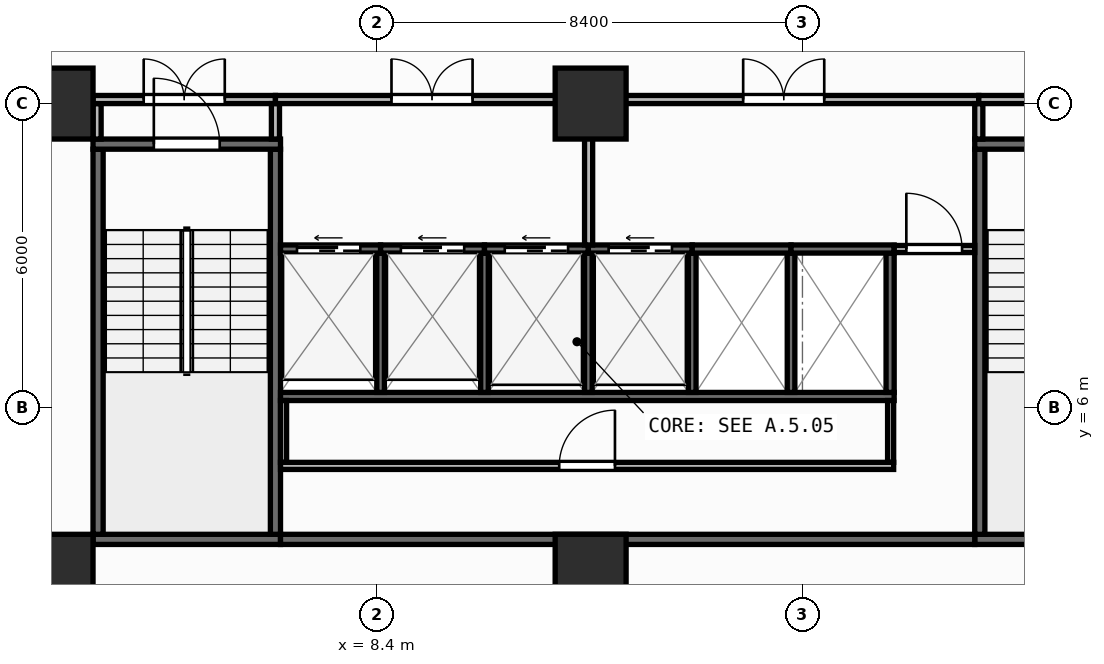
"""IFC4 building model, lengths in metres.
Left out: names, types, materials, properties, quantities, classifications, styles, units other than length and angle.
Written with IfcOpenShell. Run it as: python <this file> out.ifc"""

import sys

from ifc_helpers import new_model, si_unit, direction, frame, frame_2d, origin, origin_2d, place, context, subcontext, project, spatial, rectangle, extrude, element, fill, save


model = new_model("IFC4")
c1 = context("Model", 3, precision=1e-05, world=origin(), true_north=direction((0.0, 1.0)))
c2 = subcontext(c1, "Body", "Model", "MODEL_VIEW")
j1 = project(units=[si_unit("LENGTHUNIT", "METRE"), si_unit("PLANEANGLEUNIT", "RADIAN")], contexts=[c1])
p1 = place(None, origin())
s1 = spatial("IfcSite", under=j1, at=p1, CompositionType="ELEMENT")
p2 = place(p1, origin())
s2 = spatial("IfcBuilding", under=s1, at=p2, CompositionType="ELEMENT")
p3 = place(p2, frame((0.0, 0.0, 22.5)))
s3 = spatial("IfcBuildingStorey", under=s2, at=p3, CompositionType="ELEMENT", Elevation=22.5)
for number, where, z_axis, x_axis in (
    (1, (2.1, 2.8, 0.0), (0.0, 0.0, 1.0), (1.0, 0.0, 0.0)),
    (2, (12.62, 2.8, 0.0), (0.0, 0.0, 1.0), (1.0, 0.0, 0.0)),
    (3, (2.1, 12.0, 0.0), (0.0, 0.0, 1.0), (1.0, 0.0, 0.0)),
    (4, (12.62, 12.0, 0.0), (0.0, 0.0, 1.0), (1.0, 0.0, 0.0)),
):
    element("IfcColumn", number, at=place(p3, frame(where, z_axis=z_axis, x_axis=x_axis)), inside=s3, PredefinedType="COLUMN", context=c2, shape_type="SweptSolid", body=[
        extrude(rectangle(XDim=1.4, YDim=1.4, at=origin_2d()), origin(), (0.0, 0.0, 1.0), 3.95),
    ])
p4 = place(p3, frame((2.76, 0.174, 0.0), z_axis=(0.0, 0.0, 1.0), x_axis=(0.996571478456, 0.082736257641, 0.0)))
e5 = element("IfcWall", 5, at=p4, inside=s3, PredefinedType="STANDARD", context=c2, shape_type="SweptSolid", body=[
    extrude(rectangle(XDim=52.861, YDim=0.26, at=frame_2d((26.431, 0.0))), origin(), (0.0, 0.0, 1.0), 3.71),
])
p5 = place(p4, frame((25.231, 0.0, 0.9)))
e6 = element("IfcOpeningElement", 6, at=p5, cuts=e5, PredefinedType="OPENING", context=c2, shape_type="SweptSolid", body=[
    extrude(rectangle(XDim=2.4, YDim=1.65, at=frame_2d((1.2, 0.825))), frame((0.0, 0.14, 0.0), z_axis=(0.0, -1.0, 0.0), x_axis=(1.0, 0.0, 0.0)), (0.0, 0.0, 1.0), 0.28),
])
p6 = place(p3, frame((2.8, 3.4, 0.0), z_axis=(0.0, 0.0, 1.0), x_axis=(1.0, 0.0, 0.0)))
e7 = element("IfcWall", 7, at=p6, inside=s3, PredefinedType="SHEAR", context=c2, shape_type="SweptSolid", body=[
    extrude(rectangle(XDim=3.7, YDim=0.2, at=frame_2d((1.85, 0.0))), origin(), (0.0, 0.0, 1.0), 3.71),
])
for number, where, z_axis, x_axis in (
    (8, (2.9, 3.5, 0.0), (0.0, 0.0, 1.0), (0.0, 1.0, 0.0)),
    (9, (6.4, 3.5, 0.0), (0.0, 0.0, 1.0), (0.0, 1.0, 0.0)),
):
    element("IfcWall", number, at=place(p3, frame(where, z_axis=z_axis, x_axis=x_axis)), inside=s3, PredefinedType="SHEAR", context=c2, shape_type="SweptSolid", body=[
        extrude(rectangle(XDim=7.6, YDim=0.2, at=frame_2d((3.8, 0.0))), origin(), (0.0, 0.0, 1.0), 3.71),
    ])
p7 = place(p3, frame((2.8, 11.2, 0.0), z_axis=(0.0, 0.0, 1.0), x_axis=(1.0, 0.0, 0.0)))
e10 = element("IfcWall", 10, at=p7, inside=s3, PredefinedType="SHEAR", context=c2, shape_type="SweptSolid", body=[
    extrude(rectangle(XDim=3.7, YDim=0.2, at=frame_2d((1.85, 0.0))), origin(), (0.0, 0.0, 1.0), 3.71),
])
p8 = place(p7, frame((1.2, 0.0, 0.0)))
e11 = element("IfcOpeningElement", 11, at=p8, cuts=e10, PredefinedType="OPENING", context=c2, shape_type="SweptSolid", body=[
    extrude(rectangle(XDim=1.3, YDim=2.15, at=frame_2d((0.65, 1.075))), frame((0.0, 0.11, 0.0), z_axis=(0.0, -1.0, 0.0), x_axis=(1.0, 0.0, 0.0)), (0.0, 0.0, 1.0), 0.22),
])
p9 = place(p3, frame((20.2, 3.4, 0.0), z_axis=(0.0, 0.0, 1.0), x_axis=(1.0, 0.0, 0.0)))
e12 = element("IfcWall", 12, at=p9, inside=s3, PredefinedType="SHEAR", context=c2, shape_type="SweptSolid", body=[
    extrude(rectangle(XDim=3.7, YDim=0.2, at=frame_2d((1.85, 0.0))), origin(), (0.0, 0.0, 1.0), 3.71),
])
p10 = place(p3, frame((20.3, 3.5, 0.0), z_axis=(0.0, 0.0, 1.0), x_axis=(0.0, 1.0, 0.0)))
e13 = element("IfcWall", 13, at=p10, inside=s3, PredefinedType="SHEAR", context=c2, shape_type="SweptSolid", body=[
    extrude(rectangle(XDim=7.6, YDim=0.2, at=frame_2d((3.8, 0.0))), origin(), (0.0, 0.0, 1.0), 3.71),
])
p11 = place(p3, frame((20.2, 11.2, 0.0), z_axis=(0.0, 0.0, 1.0), x_axis=(1.0, 0.0, 0.0)))
e14 = element("IfcWall", 14, at=p11, inside=s3, PredefinedType="SHEAR", context=c2, shape_type="SweptSolid", body=[
    extrude(rectangle(XDim=3.7, YDim=0.2, at=frame_2d((1.85, 0.0))), origin(), (0.0, 0.0, 1.0), 3.71),
])
p12 = place(p11, frame((1.2, 0.0, 0.0)))
e15 = element("IfcOpeningElement", 15, at=p12, cuts=e14, PredefinedType="OPENING", context=c2, shape_type="SweptSolid", body=[
    extrude(rectangle(XDim=1.3, YDim=2.15, at=frame_2d((0.65, 1.075))), frame((0.0, 0.11, 0.0), z_axis=(0.0, -1.0, 0.0), x_axis=(1.0, 0.0, 0.0)), (0.0, 0.0, 1.0), 0.22),
])
p13 = place(p3, frame((6.5, 3.4, 0.0), z_axis=(0.0, 0.0, 1.0), x_axis=(1.0, 0.0, 0.0)))
e16 = element("IfcWall", 16, at=p13, inside=s3, PredefinedType="SHEAR", context=c2, shape_type="SweptSolid", body=[
    extrude(rectangle(XDim=13.7, YDim=0.2, at=frame_2d((6.85, 0.0))), origin(), (0.0, 0.0, 1.0), 3.71),
])
p14 = place(p3, frame((6.5, 6.22, 0.0), z_axis=(0.0, 0.0, 1.0), x_axis=(1.0, 0.0, 0.0)))
e17 = element("IfcWall", 17, at=p14, inside=s3, PredefinedType="SHEAR", context=c2, shape_type="SweptSolid", body=[
    extrude(rectangle(XDim=12.11, YDim=0.16, at=frame_2d((6.055, 0.0))), origin(), (0.0, 0.0, 1.0), 3.71),
])
p15 = place(p3, frame((18.53, 6.3, 0.0), z_axis=(0.0, 0.0, 1.0), x_axis=(0.0, 1.0, 0.0)))
e18 = element("IfcWall", 18, at=p15, inside=s3, PredefinedType="SHEAR", context=c2, shape_type="SweptSolid", body=[
    extrude(rectangle(XDim=2.75, YDim=0.16, at=frame_2d((1.375, 0.0))), origin(), (0.0, 0.0, 1.0), 3.71),
])
for number, where, z_axis, x_axis in (
    (19, (8.475, 6.3, 0.0), (0.0, 0.0, 1.0), (0.0, 1.0, 0.0)),
    (20, (10.525, 6.3, 0.0), (0.0, 0.0, 1.0), (0.0, 1.0, 0.0)),
    (21, (12.575, 6.3, 0.0), (0.0, 0.0, 1.0), (0.0, 1.0, 0.0)),
    (22, (14.625, 6.3, 0.0), (0.0, 0.0, 1.0), (0.0, 1.0, 0.0)),
    (23, (16.575, 6.3, 0.0), (0.0, 0.0, 1.0), (0.0, 1.0, 0.0)),
):
    element("IfcWall", number, at=place(p3, frame(where, z_axis=z_axis, x_axis=x_axis)), inside=s3, PredefinedType="SHEAR", context=c2, shape_type="SweptSolid", body=[
        extrude(rectangle(XDim=2.75, YDim=0.15, at=frame_2d((1.375, 0.0))), origin(), (0.0, 0.0, 1.0), 3.71),
    ])
p16 = place(p3, frame((6.5, 9.13, 0.0), z_axis=(0.0, 0.0, 1.0), x_axis=(1.0, 0.0, 0.0)))
e24 = element("IfcWall", 24, at=p16, inside=s3, PredefinedType="SHEAR", context=c2, shape_type="SweptSolid", body=[
    extrude(rectangle(XDim=1.975, YDim=0.16, at=frame_2d((0.988, 0.0))), origin(), (0.0, 0.0, 1.0), 3.71),
])
p17 = place(p16, frame((0.325, 0.0, 0.0)))
e25 = element("IfcOpeningElement", 25, at=p17, cuts=e24, PredefinedType="OPENING", context=c2, shape_type="SweptSolid", body=[
    extrude(rectangle(XDim=1.25, YDim=2.15, at=frame_2d((0.625, 1.075))), frame((0.0, 0.09, 0.0), z_axis=(0.0, -1.0, 0.0), x_axis=(1.0, 0.0, 0.0)), (0.0, 0.0, 1.0), 0.18),
])
p18 = place(p3, frame((8.475, 9.13, 0.0), z_axis=(0.0, 0.0, 1.0), x_axis=(1.0, 0.0, 0.0)))
e26 = element("IfcWall", 26, at=p18, inside=s3, PredefinedType="SHEAR", context=c2, shape_type="SweptSolid", body=[
    extrude(rectangle(XDim=2.05, YDim=0.16, at=frame_2d((1.025, 0.0))), origin(), (0.0, 0.0, 1.0), 3.71),
])
p19 = place(p18, frame((0.4, 0.0, 0.0)))
e27 = element("IfcOpeningElement", 27, at=p19, cuts=e26, PredefinedType="OPENING", context=c2, shape_type="SweptSolid", body=[
    extrude(rectangle(XDim=1.25, YDim=2.15, at=frame_2d((0.625, 1.075))), frame((0.0, 0.09, 0.0), z_axis=(0.0, -1.0, 0.0), x_axis=(1.0, 0.0, 0.0)), (0.0, 0.0, 1.0), 0.18),
])
p20 = place(p3, frame((10.525, 9.13, 0.0), z_axis=(0.0, 0.0, 1.0), x_axis=(1.0, 0.0, 0.0)))
e28 = element("IfcWall", 28, at=p20, inside=s3, PredefinedType="SHEAR", context=c2, shape_type="SweptSolid", body=[
    extrude(rectangle(XDim=2.05, YDim=0.16, at=frame_2d((1.025, 0.0))), origin(), (0.0, 0.0, 1.0), 3.71),
])
p21 = place(p20, frame((0.4, 0.0, 0.0)))
e29 = element("IfcOpeningElement", 29, at=p21, cuts=e28, PredefinedType="OPENING", context=c2, shape_type="SweptSolid", body=[
    extrude(rectangle(XDim=1.25, YDim=2.15, at=frame_2d((0.625, 1.075))), frame((0.0, 0.09, 0.0), z_axis=(0.0, -1.0, 0.0), x_axis=(1.0, 0.0, 0.0)), (0.0, 0.0, 1.0), 0.18),
])
p22 = place(p3, frame((12.575, 9.13, 0.0), z_axis=(0.0, 0.0, 1.0), x_axis=(1.0, 0.0, 0.0)))
e30 = element("IfcWall", 30, at=p22, inside=s3, PredefinedType="SHEAR", context=c2, shape_type="SweptSolid", body=[
    extrude(rectangle(XDim=2.05, YDim=0.16, at=frame_2d((1.025, 0.0))), origin(), (0.0, 0.0, 1.0), 3.71),
])
p23 = place(p22, frame((0.4, 0.0, 0.0)))
e31 = element("IfcOpeningElement", 31, at=p23, cuts=e30, PredefinedType="OPENING", context=c2, shape_type="SweptSolid", body=[
    extrude(rectangle(XDim=1.25, YDim=2.15, at=frame_2d((0.625, 1.075))), frame((0.0, 0.09, 0.0), z_axis=(0.0, -1.0, 0.0), x_axis=(1.0, 0.0, 0.0)), (0.0, 0.0, 1.0), 0.18),
])
p24 = place(p3, frame((14.625, 9.13, 0.0), z_axis=(0.0, 0.0, 1.0), x_axis=(1.0, 0.0, 0.0)))
e32 = element("IfcWall", 32, at=p24, inside=s3, PredefinedType="SHEAR", context=c2, shape_type="SweptSolid", body=[
    extrude(rectangle(XDim=1.95, YDim=0.16, at=frame_2d((0.975, 0.0))), origin(), (0.0, 0.0, 1.0), 3.71),
])
p25 = place(p3, frame((16.575, 9.13, 0.0), z_axis=(0.0, 0.0, 1.0), x_axis=(1.0, 0.0, 0.0)))
e33 = element("IfcWall", 33, at=p25, inside=s3, PredefinedType="SHEAR", context=c2, shape_type="SweptSolid", body=[
    extrude(rectangle(XDim=2.035, YDim=0.16, at=frame_2d((1.018, 0.0))), origin(), (0.0, 0.0, 1.0), 3.71),
])
for number, where, z_axis, x_axis in (
    (34, (6.56, 4.92, 0.0), (0.0, 0.0, 1.0), (0.0, 1.0, 0.0)),
    (35, (18.54, 4.92, 0.0), (0.0, 0.0, 1.0), (0.0, 1.0, 0.0)),
):
    element("IfcWall", number, at=place(p3, frame(where, z_axis=z_axis, x_axis=x_axis)), inside=s3, PredefinedType="PARTITIONING", context=c2, shape_type="SweptSolid", body=[
        extrude(rectangle(XDim=1.22, YDim=0.12, at=frame_2d((0.61, 0.0))), origin(), (0.0, 0.0, 1.0), 3.71),
    ])
p26 = place(p3, frame((6.5, 4.85, 0.0), z_axis=(0.0, 0.0, 1.0), x_axis=(1.0, 0.0, 0.0)))
e36 = element("IfcWall", 36, at=p26, inside=s3, PredefinedType="PARTITIONING", context=c2, shape_type="SweptSolid", body=[
    extrude(rectangle(XDim=12.1, YDim=0.14, at=frame_2d((6.05, 0.0))), origin(), (0.0, 0.0, 1.0), 3.71),
])
p27 = place(p26, frame((5.5, 0.0, 0.0)))
e37 = element("IfcOpeningElement", 37, at=p27, cuts=e36, PredefinedType="OPENING", context=c2, shape_type="SweptSolid", body=[
    extrude(rectangle(XDim=1.1, YDim=2.1, at=frame_2d((0.55, 1.05))), frame((0.0, 0.08, 0.0), z_axis=(0.0, -1.0, 0.0), x_axis=(1.0, 0.0, 0.0)), (0.0, 0.0, 1.0), 0.16),
])
p28 = place(p3, frame((18.61, 9.13, 0.0), z_axis=(0.0, 0.0, 1.0), x_axis=(1.0, 0.0, 0.0)))
e38 = element("IfcWall", 38, at=p28, inside=s3, PredefinedType="PARTITIONING", context=c2, shape_type="SweptSolid", body=[
    extrude(rectangle(XDim=1.59, YDim=0.14, at=frame_2d((0.795, 0.0))), origin(), (0.0, 0.0, 1.0), 3.71),
])
p29 = place(p28, frame((0.24, 0.0, 0.0)))
e39 = element("IfcOpeningElement", 39, at=p29, cuts=e38, PredefinedType="OPENING", context=c2, shape_type="SweptSolid", body=[
    extrude(rectangle(XDim=1.1, YDim=2.1, at=frame_2d((0.55, 1.05))), frame((0.0, 0.08, 0.0), z_axis=(0.0, -1.0, 0.0), x_axis=(1.0, 0.0, 0.0)), (0.0, 0.0, 1.0), 0.16),
])
p30 = place(p3, frame((2.88, 11.3, 0.0), z_axis=(0.0, 0.0, 1.0), x_axis=(0.0, 1.0, 0.0)))
e40 = element("IfcWall", 40, at=p30, inside=s3, PredefinedType="PARTITIONING", context=c2, shape_type="SweptSolid", body=[
    extrude(rectangle(XDim=0.7, YDim=0.16, at=frame_2d((0.35, 0.0))), origin(), (0.0, 0.0, 1.0), 3.71),
])
p31 = place(p3, frame((2.8, 12.08, 0.0), z_axis=(0.0, 0.0, 1.0), x_axis=(1.0, 0.0, 0.0)))
e41 = element("IfcWall", 41, at=p31, inside=s3, PredefinedType="PARTITIONING", context=c2, shape_type="SweptSolid", body=[
    extrude(rectangle(XDim=3.6, YDim=0.16, at=frame_2d((1.8, 0.0))), origin(), (0.0, 0.0, 1.0), 3.073),
])
p32 = place(p31, frame((1.0, 0.0, 0.0)))
e42 = element("IfcOpeningElement", 42, at=p32, cuts=e41, PredefinedType="OPENING", context=c2, shape_type="SweptSolid", body=[
    extrude(rectangle(XDim=1.6, YDim=2.05, at=frame_2d((0.8, 1.025))), frame((0.0, 0.09, 0.0), z_axis=(0.0, -1.0, 0.0), x_axis=(1.0, 0.0, 0.0)), (0.0, 0.0, 1.0), 0.18),
])
p33 = place(p3, frame((6.4, 11.3, 0.0), z_axis=(0.0, 0.0, 1.0), x_axis=(0.0, 1.0, 0.0)))
e43 = element("IfcWall", 43, at=p33, inside=s3, PredefinedType="PARTITIONING", context=c2, shape_type="SweptSolid", body=[
    extrude(rectangle(XDim=0.7, YDim=0.16, at=frame_2d((0.35, 0.0))), origin(), (0.0, 0.0, 1.0), 3.71),
])
p34 = place(p3, frame((6.4, 12.08, 0.0), z_axis=(0.0, 0.0, 1.0), x_axis=(1.0, 0.0, 0.0)))
e44 = element("IfcWall", 44, at=p34, inside=s3, PredefinedType="PARTITIONING", context=c2, shape_type="SweptSolid", body=[
    extrude(rectangle(XDim=6.18, YDim=0.16, at=frame_2d((3.09, 0.0))), origin(), (0.0, 0.0, 1.0), 3.073),
])
p35 = place(p34, frame((2.29, 0.0, 0.0)))
e45 = element("IfcOpeningElement", 45, at=p35, cuts=e44, PredefinedType="OPENING", context=c2, shape_type="SweptSolid", body=[
    extrude(rectangle(XDim=1.6, YDim=2.05, at=frame_2d((0.8, 1.025))), frame((0.0, 0.09, 0.0), z_axis=(0.0, -1.0, 0.0), x_axis=(1.0, 0.0, 0.0)), (0.0, 0.0, 1.0), 0.18),
])
p36 = place(p3, frame((12.58, 9.21, 0.0), z_axis=(0.0, 0.0, 1.0), x_axis=(0.0, 1.0, 0.0)))
e46 = element("IfcWall", 46, at=p36, inside=s3, PredefinedType="PARTITIONING", context=c2, shape_type="SweptSolid", body=[
    extrude(rectangle(XDim=2.79, YDim=0.16, at=frame_2d((1.395, 0.0))), origin(), (0.0, 0.0, 1.0), 3.71),
])
p37 = place(p3, frame((12.58, 12.08, 0.0), z_axis=(0.0, 0.0, 1.0), x_axis=(1.0, 0.0, 0.0)))
e47 = element("IfcWall", 47, at=p37, inside=s3, PredefinedType="PARTITIONING", context=c2, shape_type="SweptSolid", body=[
    extrude(rectangle(XDim=7.7, YDim=0.16, at=frame_2d((3.85, 0.0))), origin(), (0.0, 0.0, 1.0), 3.073),
])
p38 = place(p37, frame((3.05, 0.0, 0.0)))
e48 = element("IfcOpeningElement", 48, at=p38, cuts=e47, PredefinedType="OPENING", context=c2, shape_type="SweptSolid", body=[
    extrude(rectangle(XDim=1.6, YDim=2.05, at=frame_2d((0.8, 1.025))), frame((0.0, 0.09, 0.0), z_axis=(0.0, -1.0, 0.0), x_axis=(1.0, 0.0, 0.0)), (0.0, 0.0, 1.0), 0.18),
])
p39 = place(p3, frame((20.28, 11.3, 0.0), z_axis=(0.0, 0.0, 1.0), x_axis=(0.0, 1.0, 0.0)))
e49 = element("IfcWall", 49, at=p39, inside=s3, PredefinedType="PARTITIONING", context=c2, shape_type="SweptSolid", body=[
    extrude(rectangle(XDim=0.7, YDim=0.16, at=frame_2d((0.35, 0.0))), origin(), (0.0, 0.0, 1.0), 3.71),
])
p40 = place(p3, frame((20.28, 12.08, 0.0), z_axis=(0.0, 0.0, 1.0), x_axis=(1.0, 0.0, 0.0)))
e50 = element("IfcWall", 50, at=p40, inside=s3, PredefinedType="PARTITIONING", context=c2, shape_type="SweptSolid", body=[
    extrude(rectangle(XDim=3.62, YDim=0.16, at=frame_2d((1.81, 0.0))), origin(), (0.0, 0.0, 1.0), 3.073),
])
p41 = place(p40, frame((1.01, 0.0, 0.0)))
e51 = element("IfcOpeningElement", 51, at=p41, cuts=e50, PredefinedType="OPENING", context=c2, shape_type="SweptSolid", body=[
    extrude(rectangle(XDim=1.6, YDim=2.05, at=frame_2d((0.8, 1.025))), frame((0.0, 0.09, 0.0), z_axis=(0.0, -1.0, 0.0), x_axis=(1.0, 0.0, 0.0)), (0.0, 0.0, 1.0), 0.18),
])
p42 = place(p8, origin())
e52 = element("IfcDoor", 52, at=p42, inside=s3, OperationType="SINGLE_SWING_LEFT", PredefinedType="DOOR", context=c2, shape_type="SweptSolid", body=[
    extrude(rectangle(XDim=1.3, YDim=2.15, at=frame_2d((0.65, 1.075))), frame((0.0, 0.025, 0.0), z_axis=(0.0, -1.0, 0.0), x_axis=(1.0, 0.0, 0.0)), (0.0, 0.0, 1.0), 0.05),
])
fill(e11, e52)
p43 = place(p17, origin())
e53 = element("IfcDoor", 53, at=p43, inside=s3, OperationType="SLIDING_TO_LEFT", PredefinedType="DOOR", context=c2, shape_type="SweptSolid", body=[
    extrude(rectangle(XDim=1.25, YDim=2.15, at=frame_2d((0.625, 1.075))), frame((0.0, 0.025, 0.0), z_axis=(0.0, -1.0, 0.0), x_axis=(1.0, 0.0, 0.0)), (0.0, 0.0, 1.0), 0.05),
])
fill(e25, e53)
p44 = place(p19, origin())
e54 = element("IfcDoor", 54, at=p44, inside=s3, OperationType="SLIDING_TO_LEFT", PredefinedType="DOOR", context=c2, shape_type="SweptSolid", body=[
    extrude(rectangle(XDim=1.25, YDim=2.15, at=frame_2d((0.625, 1.075))), frame((0.0, 0.025, 0.0), z_axis=(0.0, -1.0, 0.0), x_axis=(1.0, 0.0, 0.0)), (0.0, 0.0, 1.0), 0.05),
])
fill(e27, e54)
p45 = place(p21, origin())
e55 = element("IfcDoor", 55, at=p45, inside=s3, OperationType="SLIDING_TO_LEFT", PredefinedType="DOOR", context=c2, shape_type="SweptSolid", body=[
    extrude(rectangle(XDim=1.25, YDim=2.15, at=frame_2d((0.625, 1.075))), frame((0.0, 0.025, 0.0), z_axis=(0.0, -1.0, 0.0), x_axis=(1.0, 0.0, 0.0)), (0.0, 0.0, 1.0), 0.05),
])
fill(e29, e55)
p46 = place(p23, origin())
e56 = element("IfcDoor", 56, at=p46, inside=s3, OperationType="SLIDING_TO_LEFT", PredefinedType="DOOR", context=c2, shape_type="SweptSolid", body=[
    extrude(rectangle(XDim=1.25, YDim=2.15, at=frame_2d((0.625, 1.075))), frame((0.0, 0.025, 0.0), z_axis=(0.0, -1.0, 0.0), x_axis=(1.0, 0.0, 0.0)), (0.0, 0.0, 1.0), 0.05),
])
fill(e31, e56)
p47 = place(p27, origin())
e57 = element("IfcDoor", 57, at=p47, inside=s3, OperationType="SINGLE_SWING_RIGHT", PredefinedType="DOOR", context=c2, shape_type="SweptSolid", body=[
    extrude(rectangle(XDim=1.1, YDim=2.1, at=frame_2d((0.55, 1.05))), frame((0.0, 0.025, 0.0), z_axis=(0.0, -1.0, 0.0), x_axis=(1.0, 0.0, 0.0)), (0.0, 0.0, 1.0), 0.05),
])
fill(e37, e57)
p48 = place(p29, origin())
e58 = element("IfcDoor", 58, at=p48, inside=s3, OperationType="SINGLE_SWING_LEFT", PredefinedType="DOOR", context=c2, shape_type="SweptSolid", body=[
    extrude(rectangle(XDim=1.1, YDim=2.1, at=frame_2d((0.55, 1.05))), frame((0.0, 0.025, 0.0), z_axis=(0.0, -1.0, 0.0), x_axis=(1.0, 0.0, 0.0)), (0.0, 0.0, 1.0), 0.05),
])
fill(e39, e58)
p49 = place(p32, origin())
e59 = element("IfcDoor", 59, at=p49, inside=s3, OperationType="DOUBLE_DOOR_SINGLE_SWING", PredefinedType="DOOR", context=c2, shape_type="SweptSolid", body=[
    extrude(rectangle(XDim=1.6, YDim=2.05, at=frame_2d((0.8, 1.025))), frame((0.0, 0.025, 0.0), z_axis=(0.0, -1.0, 0.0), x_axis=(1.0, 0.0, 0.0)), (0.0, 0.0, 1.0), 0.05),
])
fill(e42, e59)
p50 = place(p35, origin())
e60 = element("IfcDoor", 60, at=p50, inside=s3, OperationType="DOUBLE_DOOR_SINGLE_SWING", PredefinedType="DOOR", context=c2, shape_type="SweptSolid", body=[
    extrude(rectangle(XDim=1.6, YDim=2.05, at=frame_2d((0.8, 1.025))), frame((0.0, 0.025, 0.0), z_axis=(0.0, -1.0, 0.0), x_axis=(1.0, 0.0, 0.0)), (0.0, 0.0, 1.0), 0.05),
])
fill(e45, e60)
p51 = place(p38, origin())
e61 = element("IfcDoor", 61, at=p51, inside=s3, OperationType="DOUBLE_DOOR_SINGLE_SWING", PredefinedType="DOOR", context=c2, shape_type="SweptSolid", body=[
    extrude(rectangle(XDim=1.6, YDim=2.05, at=frame_2d((0.8, 1.025))), frame((0.0, 0.025, 0.0), z_axis=(0.0, -1.0, 0.0), x_axis=(1.0, 0.0, 0.0)), (0.0, 0.0, 1.0), 0.05),
])
fill(e48, e61)
save(model, sys.argv[1])
